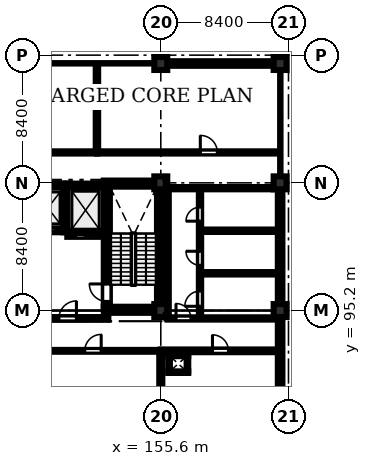
"""IFC4 building model, lengths in metres.
Left out: names, types, materials, properties, quantities, classifications, styles, units other than length and angle.
Written with IfcOpenShell. Run it as: python <this file> out.ifc"""

import sys

from ifc_helpers import new_model, si_unit, direction, frame, frame_2d, origin, origin_2d, place, context, subcontext, project, spatial, rectangle, extrude, element, fill, save


model = new_model("IFC4")
c1 = context("Model", 3, precision=1e-05, world=origin(), true_north=direction((0.0, 1.0)))
c2 = subcontext(c1, "Body", "Model", "MODEL_VIEW")
j1 = project(units=[si_unit("LENGTHUNIT", "METRE"), si_unit("PLANEANGLEUNIT", "RADIAN")], contexts=[c1])
p1 = place(None, origin())
s1 = spatial("IfcSite", under=j1, at=p1, CompositionType="ELEMENT")
p2 = place(p1, origin())
s2 = spatial("IfcBuilding", under=s1, at=p2, CompositionType="ELEMENT")
p3 = place(p2, frame((0.0, 0.0, 23.4)))
s3 = spatial("IfcBuildingStorey", under=s2, at=p3, CompositionType="ELEMENT", Elevation=23.4)
for number, where, z_axis, x_axis in (
    (1, (155.6, 95.2, 0.0), (0.0, 0.0, 1.0), (1.0, 0.0, 0.0)),
    (2, (155.6, 103.6, 0.0), (0.0, 0.0, 1.0), (1.0, 0.0, 0.0)),
    (3, (155.6, 111.45, 0.0), (0.0, 0.0, 1.0), (1.0, 0.0, 0.0)),
    (4, (163.45, 95.2, 0.0), (0.0, 0.0, 1.0), (1.0, 0.0, 0.0)),
    (5, (163.45, 103.6, 0.0), (0.0, 0.0, 1.0), (1.0, 0.0, 0.0)),
    (6, (163.45, 111.45, 0.0), (0.0, 0.0, 1.0), (1.0, 0.0, 0.0)),
):
    element("IfcColumn", number, at=place(p3, frame(where, z_axis=z_axis, x_axis=x_axis)), inside=s3, PredefinedType="COLUMN", context=c2, shape_type="SweptSolid", body=[
        extrude(rectangle(XDim=0.85, YDim=0.85, at=origin_2d()), origin(), (0.0, 0.0, 1.0), 4.0),
    ])
for number, where, z_axis, x_axis in (
    (7, (151.85, 95.25, 0.0), (0.0, 0.0, 1.0), (1.0, 0.0, 0.0)),
    (8, (151.85, 103.55, 0.0), (0.0, 0.0, 1.0), (1.0, 0.0, 0.0)),
):
    element("IfcWall", number, at=place(p3, frame(where, z_axis=z_axis, x_axis=x_axis)), inside=s3, PredefinedType="SHEAR", context=c2, shape_type="SweptSolid", body=[
        extrude(rectangle(XDim=3.9, YDim=0.4, at=frame_2d((1.95, 0.0))), origin(), (0.0, 0.0, 1.0), 4.0),
    ])
p4 = place(p3, frame((152.05, 95.45, 0.0), z_axis=(0.0, 0.0, 1.0), x_axis=(0.0, 1.0, 0.0)))
e9 = element("IfcWall", 9, at=p4, inside=s3, PredefinedType="SHEAR", context=c2, shape_type="SweptSolid", body=[
    extrude(rectangle(XDim=7.9, YDim=0.4, at=frame_2d((3.95, 0.0))), origin(), (0.0, 0.0, 1.0), 4.0),
])
p5 = place(p4, frame((0.35, 0.0, 0.0)))
e10 = element("IfcOpeningElement", 10, at=p5, cuts=e9, PredefinedType="OPENING", context=c2, shape_type="SweptSolid", body=[
    extrude(rectangle(XDim=1.15, YDim=2.15, at=frame_2d((0.575, 1.075))), frame((0.0, 0.21, 0.0), z_axis=(0.0, -1.0, 0.0), x_axis=(1.0, 0.0, 0.0)), (0.0, 0.0, 1.0), 0.42),
])
p6 = place(p3, frame((155.55, 95.45, 0.0), z_axis=(0.0, 0.0, 1.0), x_axis=(0.0, 1.0, 0.0)))
e11 = element("IfcWall", 11, at=p6, inside=s3, PredefinedType="SHEAR", context=c2, shape_type="SweptSolid", body=[
    extrude(rectangle(XDim=7.9, YDim=0.4, at=frame_2d((3.95, 0.0))), origin(), (0.0, 0.0, 1.0), 4.0),
])
p7 = place(p3, frame((147.15, 100.475, 0.0), z_axis=(0.0, 0.0, 1.0), x_axis=(1.0, 0.0, 0.0)))
e12 = element("IfcWall", 12, at=p7, inside=s3, PredefinedType="SHEAR", context=c2, shape_type="SweptSolid", body=[
    extrude(rectangle(XDim=2.05, YDim=0.25, at=frame_2d((1.025, 0.0))), origin(), (0.0, 0.0, 1.0), 4.0),
])
p8 = place(p7, frame((0.495, 0.0, 0.0)))
e13 = element("IfcOpeningElement", 13, at=p8, cuts=e12, PredefinedType="OPENING", context=c2, shape_type="SweptSolid", body=[
    extrude(rectangle(XDim=1.06, YDim=2.15, at=frame_2d((0.53, 1.075))), frame((0.0, 0.135, 0.0), z_axis=(0.0, -1.0, 0.0), x_axis=(1.0, 0.0, 0.0)), (0.0, 0.0, 1.0), 0.27),
])
p9 = place(p3, frame((147.15, 103.425, 0.0), z_axis=(0.0, 0.0, 1.0), x_axis=(1.0, 0.0, 0.0)))
e14 = element("IfcWall", 14, at=p9, inside=s3, PredefinedType="SHEAR", context=c2, shape_type="SweptSolid", body=[
    extrude(rectangle(XDim=2.05, YDim=0.25, at=frame_2d((1.025, 0.0))), origin(), (0.0, 0.0, 1.0), 4.0),
])
p10 = place(p3, frame((149.325, 100.35, 0.0), z_axis=(0.0, 0.0, 1.0), x_axis=(0.0, 1.0, 0.0)))
e15 = element("IfcWall", 15, at=p10, inside=s3, PredefinedType="SHEAR", context=c2, shape_type="SweptSolid", body=[
    extrude(rectangle(XDim=3.2, YDim=0.25, at=frame_2d((1.6, 0.0))), origin(), (0.0, 0.0, 1.0), 4.0),
])
p11 = place(p3, frame((149.45, 100.175, 0.0), z_axis=(0.0, 0.0, 1.0), x_axis=(1.0, 0.0, 0.0)))
e16 = element("IfcWall", 16, at=p11, inside=s3, PredefinedType="SHEAR", context=c2, shape_type="SweptSolid", body=[
    extrude(rectangle(XDim=2.4, YDim=0.25, at=frame_2d((1.2, 0.0))), origin(), (0.0, 0.0, 1.0), 4.0),
])
p12 = place(p11, frame((0.55, 0.0, 0.0)))
e17 = element("IfcOpeningElement", 17, at=p12, cuts=e16, PredefinedType="OPENING", context=c2, shape_type="SweptSolid", body=[
    extrude(rectangle(XDim=1.3, YDim=2.25, at=frame_2d((0.65, 1.125))), frame((0.0, 0.135, 0.0), z_axis=(0.0, -1.0, 0.0), x_axis=(1.0, 0.0, 0.0)), (0.0, 0.0, 1.0), 0.27),
])
p13 = place(p3, frame((149.45, 103.425, 0.0), z_axis=(0.0, 0.0, 1.0), x_axis=(1.0, 0.0, 0.0)))
e18 = element("IfcWall", 18, at=p13, inside=s3, PredefinedType="SHEAR", context=c2, shape_type="SweptSolid", body=[
    extrude(rectangle(XDim=2.4, YDim=0.25, at=frame_2d((1.2, 0.0))), origin(), (0.0, 0.0, 1.0), 4.0),
])
p14 = place(p3, frame((156.025, 111.45, 0.0), z_axis=(0.0, 0.0, 1.0), x_axis=(1.0, 0.0, 0.0)))
e19 = element("IfcWall", 19, at=p14, inside=s3, PredefinedType="STANDARD", context=c2, shape_type="SweptSolid", body=[
    extrude(rectangle(XDim=7.0, YDim=0.3, at=frame_2d((3.5, 0.0))), origin(), (0.0, 0.0, 1.0), 3.3),
])
p15 = place(p14, frame((0.85, 0.0, 0.9)))
e20 = element("IfcOpeningElement", 20, at=p15, cuts=e19, PredefinedType="OPENING", context=c2, shape_type="SweptSolid", body=[
    extrude(rectangle(XDim=1.8, YDim=2.1, at=frame_2d((0.9, 1.05))), frame((0.0, 0.16, 0.0), z_axis=(0.0, -1.0, 0.0), x_axis=(1.0, 0.0, 0.0)), (0.0, 0.0, 1.0), 0.32),
])
p16 = place(p14, frame((4.65, 0.0, 0.9)))
e21 = element("IfcOpeningElement", 21, at=p16, cuts=e19, PredefinedType="OPENING", context=c2, shape_type="SweptSolid", body=[
    extrude(rectangle(XDim=1.8, YDim=2.1, at=frame_2d((0.9, 1.05))), frame((0.0, 0.16, 0.0), z_axis=(0.0, -1.0, 0.0), x_axis=(1.0, 0.0, 0.0)), (0.0, 0.0, 1.0), 0.32),
])
p17 = place(p3, frame((163.45, 94.775, 0.0), z_axis=(0.0, 0.0, 1.0), x_axis=(0.0, -1.0, 0.0)))
e22 = element("IfcWall", 22, at=p17, inside=s3, PredefinedType="STANDARD", context=c2, shape_type="SweptSolid", body=[
    extrude(rectangle(XDim=7.55, YDim=0.3, at=frame_2d((3.775, 0.0))), origin(), (0.0, 0.0, 1.0), 3.3),
])
p18 = place(p17, frame((4.2, 0.0, 1.1)))
e23 = element("IfcOpeningElement", 23, at=p18, cuts=e22, PredefinedType="OPENING", context=c2, shape_type="SweptSolid", body=[
    extrude(rectangle(XDim=1.55, YDim=1.75, at=frame_2d((0.775, 0.875))), frame((0.0, 0.16, 0.0), z_axis=(0.0, -1.0, 0.0), x_axis=(1.0, 0.0, 0.0)), (0.0, 0.0, 1.0), 0.32),
])
p19 = place(p3, frame((163.45, 103.175, 0.0), z_axis=(0.0, 0.0, 1.0), x_axis=(0.0, -1.0, 0.0)))
e24 = element("IfcWall", 24, at=p19, inside=s3, PredefinedType="STANDARD", context=c2, shape_type="SweptSolid", body=[
    extrude(rectangle(XDim=7.55, YDim=0.3, at=frame_2d((3.775, 0.0))), origin(), (0.0, 0.0, 1.0), 3.3),
])
p20 = place(p19, frame((1.15, 0.0, 1.1)))
e25 = element("IfcOpeningElement", 25, at=p20, cuts=e24, PredefinedType="OPENING", context=c2, shape_type="SweptSolid", body=[
    extrude(rectangle(XDim=1.4, YDim=1.4, at=frame_2d((0.7, 0.7))), frame((0.0, 0.16, 0.0), z_axis=(0.0, -1.0, 0.0), x_axis=(1.0, 0.0, 0.0)), (0.0, 0.0, 1.0), 0.32),
])
p21 = place(p3, frame((147.3, 94.68, 0.0), z_axis=(0.0, 0.0, 1.0), x_axis=(1.0, 0.0, 0.0)))
e26 = element("IfcWall", 26, at=p21, inside=s3, PredefinedType="STANDARD", context=c2, shape_type="SweptSolid", body=[
    extrude(rectangle(XDim=4.85, YDim=0.18, at=frame_2d((2.425, 0.0))), origin(), (0.0, 0.0, 1.0), 4.0),
])
p22 = place(p21, frame((1.6, 0.0, 0.0)))
e27 = element("IfcOpeningElement", 27, at=p22, cuts=e26, PredefinedType="OPENING", context=c2, shape_type="SweptSolid", body=[
    extrude(rectangle(XDim=1.15, YDim=2.15, at=frame_2d((0.575, 1.075))), frame((0.0, 0.1, 0.0), z_axis=(0.0, -1.0, 0.0), x_axis=(1.0, 0.0, 0.0)), (0.0, 0.0, 1.0), 0.2),
])
p23 = place(p3, frame((156.05, 94.68, 0.0), z_axis=(0.0, 0.0, 1.0), x_axis=(1.0, 0.0, 0.0)))
e28 = element("IfcWall", 28, at=p23, inside=s3, PredefinedType="PARTITIONING", context=c2, shape_type="SweptSolid", body=[
    extrude(rectangle(XDim=7.15, YDim=0.15, at=frame_2d((3.575, 0.0))), origin(), (0.0, 0.0, 1.0), 4.0),
])
p24 = place(p23, frame((0.55, 0.0, 0.0)))
e29 = element("IfcOpeningElement", 29, at=p24, cuts=e28, PredefinedType="OPENING", context=c2, shape_type="SweptSolid", body=[
    extrude(rectangle(XDim=0.98, YDim=2.12, at=frame_2d((0.49, 1.06))), frame((0.0, 0.085, 0.0), z_axis=(0.0, -1.0, 0.0), x_axis=(1.0, 0.0, 0.0)), (0.0, 0.0, 1.0), 0.17),
])
p25 = place(p3, frame((158.18, 94.68, 0.0), z_axis=(0.0, 0.0, 1.0), x_axis=(0.0, 1.0, 0.0)))
e30 = element("IfcWall", 30, at=p25, inside=s3, PredefinedType="PARTITIONING", context=c2, shape_type="SweptSolid", body=[
    extrude(rectangle(XDim=8.57, YDim=0.15, at=frame_2d((4.285, 0.0))), origin(), (0.0, 0.0, 1.0), 4.0),
])
p26 = place(p25, frame((0.8, 0.0, 0.0)))
e31 = element("IfcOpeningElement", 31, at=p26, cuts=e30, PredefinedType="OPENING", context=c2, shape_type="SweptSolid", body=[
    extrude(rectangle(XDim=1.0, YDim=2.12, at=frame_2d((0.5, 1.06))), frame((0.0, 0.085, 0.0), z_axis=(0.0, -1.0, 0.0), x_axis=(1.0, 0.0, 0.0)), (0.0, 0.0, 1.0), 0.17),
])
p27 = place(p25, frame((3.5, 0.0, 0.0)))
e32 = element("IfcOpeningElement", 32, at=p27, cuts=e30, PredefinedType="OPENING", context=c2, shape_type="SweptSolid", body=[
    extrude(rectangle(XDim=0.92, YDim=2.1, at=frame_2d((0.46, 1.05))), frame((0.0, 0.085, 0.0), z_axis=(0.0, -1.0, 0.0), x_axis=(1.0, 0.0, 0.0)), (0.0, 0.0, 1.0), 0.17),
])
p28 = place(p25, frame((6.4, 0.0, 0.0)))
e33 = element("IfcOpeningElement", 33, at=p28, cuts=e30, PredefinedType="OPENING", context=c2, shape_type="SweptSolid", body=[
    extrude(rectangle(XDim=0.92, YDim=2.1, at=frame_2d((0.46, 1.05))), frame((0.0, 0.085, 0.0), z_axis=(0.0, -1.0, 0.0), x_axis=(1.0, 0.0, 0.0)), (0.0, 0.0, 1.0), 0.17),
])
for number, where, z_axis, x_axis in (
    (34, (158.18, 97.65, 0.0), (0.0, 0.0, 1.0), (1.0, 0.0, 0.0)),
    (35, (158.18, 100.45, 0.0), (0.0, 0.0, 1.0), (1.0, 0.0, 0.0)),
):
    element("IfcWall", number, at=place(p3, frame(where, z_axis=z_axis, x_axis=x_axis)), inside=s3, PredefinedType="PARTITIONING", context=c2, shape_type="SweptSolid", body=[
        extrude(rectangle(XDim=5.02, YDim=0.158, at=frame_2d((2.51, 0.0))), origin(), (0.0, 0.0, 1.0), 4.0),
    ])
p29 = place(p3, frame((156.05, 103.25, 0.0), z_axis=(0.0, 0.0, 1.0), x_axis=(1.0, 0.0, 0.0)))
e36 = element("IfcWall", 36, at=p29, inside=s3, PredefinedType="PARTITIONING", context=c2, shape_type="SweptSolid", body=[
    extrude(rectangle(XDim=7.15, YDim=0.15, at=frame_2d((3.575, 0.0))), origin(), (0.0, 0.0, 1.0), 4.0),
])
p30 = place(p3, frame((156.05, 94.68, 0.0), z_axis=(0.0, 0.0, 1.0), x_axis=(0.0, 1.0, 0.0)))
e37 = element("IfcWall", 37, at=p30, inside=s3, PredefinedType="PARTITIONING", context=c2, shape_type="SweptSolid", body=[
    extrude(rectangle(XDim=8.57, YDim=0.15, at=frame_2d((4.285, 0.0))), origin(), (0.0, 0.0, 1.0), 4.0),
])
p31 = place(p3, frame((134.6, 105.6, 0.0), z_axis=(0.0, 0.0, 1.0), x_axis=(1.0, 0.0, 0.0)))
e38 = element("IfcWall", 38, at=p31, inside=s3, PredefinedType="PARTITIONING", context=c2, shape_type="SweptSolid", body=[
    extrude(rectangle(XDim=16.8, YDim=0.145, at=frame_2d((8.4, 0.0))), origin(), (0.0, 0.0, 1.0), 4.0),
])
p32 = place(p31, frame((6.8, 0.0, 0.0)))
e39 = element("IfcOpeningElement", 39, at=p32, cuts=e38, PredefinedType="OPENING", context=c2, shape_type="SweptSolid", body=[
    extrude(rectangle(XDim=1.46, YDim=2.22, at=frame_2d((0.73, 1.11))), frame((0.0, 0.083, 0.0), z_axis=(0.0, -1.0, 0.0), x_axis=(1.0, 0.0, 0.0)), (0.0, 0.0, 1.0), 0.165),
])
p33 = place(p3, frame((151.4, 105.6, 0.0), z_axis=(0.0, 0.0, 1.0), x_axis=(1.0, 0.0, 0.0)))
e40 = element("IfcWall", 40, at=p33, inside=s3, PredefinedType="PARTITIONING", context=c2, shape_type="SweptSolid", body=[
    extrude(rectangle(XDim=11.95, YDim=0.145, at=frame_2d((5.975, 0.0))), origin(), (0.0, 0.0, 1.0), 4.0),
])
p34 = place(p33, frame((6.8, 0.0, 0.0)))
e41 = element("IfcOpeningElement", 41, at=p34, cuts=e40, PredefinedType="OPENING", context=c2, shape_type="SweptSolid", body=[
    extrude(rectangle(XDim=1.12, YDim=2.18, at=frame_2d((0.56, 1.09))), frame((0.0, 0.083, 0.0), z_axis=(0.0, -1.0, 0.0), x_axis=(1.0, 0.0, 0.0)), (0.0, 0.0, 1.0), 0.165),
])
p35 = place(p3, frame((151.4, 105.6, 0.0), z_axis=(0.0, 0.0, 1.0), x_axis=(0.0, 1.0, 0.0)))
e42 = element("IfcWall", 42, at=p35, inside=s3, PredefinedType="PARTITIONING", context=c2, shape_type="SweptSolid", body=[
    extrude(rectangle(XDim=5.75, YDim=0.158, at=frame_2d((2.875, 0.0))), origin(), (0.0, 0.0, 1.0), 3.5),
])
p36 = place(p3, frame((147.2, 92.55, 0.0), z_axis=(0.0, 0.0, 1.0), x_axis=(1.0, 0.0, 0.0)))
e43 = element("IfcWall", 43, at=p36, inside=s3, PredefinedType="PARTITIONING", context=c2, shape_type="SweptSolid", body=[
    extrude(rectangle(XDim=8.4, YDim=0.12, at=frame_2d((4.2, 0.0))), origin(), (0.0, 0.0, 1.0), 4.0),
])
p37 = place(p36, frame((3.4, 0.0, 0.0)))
e44 = element("IfcOpeningElement", 44, at=p37, cuts=e43, PredefinedType="OPENING", context=c2, shape_type="SweptSolid", body=[
    extrude(rectangle(XDim=1.08, YDim=2.15, at=frame_2d((0.54, 1.075))), frame((0.0, 0.07, 0.0), z_axis=(0.0, -1.0, 0.0), x_axis=(1.0, 0.0, 0.0)), (0.0, 0.0, 1.0), 0.14),
])
p38 = place(p3, frame((155.6, 92.55, 0.0), z_axis=(0.0, 0.0, 1.0), x_axis=(1.0, 0.0, 0.0)))
e45 = element("IfcWall", 45, at=p38, inside=s3, PredefinedType="STANDARD", context=c2, shape_type="SweptSolid", body=[
    extrude(rectangle(XDim=7.75, YDim=0.18, at=frame_2d((3.875, 0.0))), origin(), (0.0, 0.0, 1.0), 4.0),
])
p39 = place(p38, frame((3.4, 0.0, 0.0)))
e46 = element("IfcOpeningElement", 46, at=p39, cuts=e45, PredefinedType="OPENING", context=c2, shape_type="SweptSolid", body=[
    extrude(rectangle(XDim=1.05, YDim=2.15, at=frame_2d((0.525, 1.075))), frame((0.0, 0.1, 0.0), z_axis=(0.0, -1.0, 0.0), x_axis=(1.0, 0.0, 0.0)), (0.0, 0.0, 1.0), 0.2),
])
p40 = place(p3, frame((155.6, 78.55, 0.0), z_axis=(0.0, 0.0, 1.0), x_axis=(0.0, 1.0, 0.0)))
e47 = element("IfcWall", 47, at=p40, inside=s3, PredefinedType="SOLIDWALL", context=c2, shape_type="SweptSolid", body=[
    extrude(rectangle(XDim=14.0, YDim=0.2, at=frame_2d((7.0, 0.0))), origin(), (0.0, 0.0, 1.0), 3.3),
])
for number, where, z_axis, x_axis in (
    (48, (156.095, 91.147, 0.0), (0.0, 0.0, 1.0), (1.0, 0.0, 0.0)),
    (49, (156.095, 92.252, 0.0), (0.0, 0.0, 1.0), (1.0, 0.0, 0.0)),
):
    element("IfcWall", number, at=place(p3, frame(where, z_axis=z_axis, x_axis=x_axis)), inside=s3, PredefinedType="PARTITIONING", context=c2, shape_type="SweptSolid", body=[
        extrude(rectangle(XDim=1.31, YDim=0.105, at=frame_2d((0.655, 0.0))), origin(), (0.0, 0.0, 1.0), 4.0),
    ])
for number, where, z_axis, x_axis in (
    (50, (156.147, 91.2, 0.0), (0.0, 0.0, 1.0), (0.0, 1.0, 0.0)),
    (51, (157.353, 91.2, 0.0), (0.0, 0.0, 1.0), (0.0, 1.0, 0.0)),
):
    element("IfcWall", number, at=place(p3, frame(where, z_axis=z_axis, x_axis=x_axis)), inside=s3, PredefinedType="PARTITIONING", context=c2, shape_type="SweptSolid", body=[
        extrude(rectangle(XDim=1.0, YDim=0.105, at=frame_2d((0.5, 0.0))), origin(), (0.0, 0.0, 1.0), 4.0),
    ])
p41 = place(p15, origin())
e52 = element("IfcWindow", 52, at=p41, inside=s3, PartitioningType="DOUBLE_PANEL_VERTICAL", PredefinedType="WINDOW", context=c2, shape_type="SweptSolid", body=[
    extrude(rectangle(XDim=1.8, YDim=2.1, at=frame_2d((0.9, 1.05))), frame((0.0, 0.03, 0.0), z_axis=(0.0, -1.0, 0.0), x_axis=(1.0, 0.0, 0.0)), (0.0, 0.0, 1.0), 0.06),
])
fill(e20, e52)
p42 = place(p16, origin())
e53 = element("IfcWindow", 53, at=p42, inside=s3, PartitioningType="DOUBLE_PANEL_VERTICAL", PredefinedType="WINDOW", context=c2, shape_type="SweptSolid", body=[
    extrude(rectangle(XDim=1.8, YDim=2.1, at=frame_2d((0.9, 1.05))), frame((0.0, 0.03, 0.0), z_axis=(0.0, -1.0, 0.0), x_axis=(1.0, 0.0, 0.0)), (0.0, 0.0, 1.0), 0.06),
])
fill(e21, e53)
p43 = place(p18, origin())
e54 = element("IfcWindow", 54, at=p43, inside=s3, PartitioningType="DOUBLE_PANEL_VERTICAL", PredefinedType="WINDOW", context=c2, shape_type="SweptSolid", body=[
    extrude(rectangle(XDim=1.55, YDim=1.75, at=frame_2d((0.775, 0.875))), frame((0.0, 0.03, 0.0), z_axis=(0.0, -1.0, 0.0), x_axis=(1.0, 0.0, 0.0)), (0.0, 0.0, 1.0), 0.06),
])
fill(e23, e54)
p44 = place(p20, origin())
e55 = element("IfcWindow", 55, at=p44, inside=s3, PartitioningType="SINGLE_PANEL", PredefinedType="WINDOW", context=c2, shape_type="SweptSolid", body=[
    extrude(rectangle(XDim=1.4, YDim=1.4, at=frame_2d((0.7, 0.7))), frame((0.0, 0.03, 0.0), z_axis=(0.0, -1.0, 0.0), x_axis=(1.0, 0.0, 0.0)), (0.0, 0.0, 1.0), 0.06),
])
fill(e25, e55)
p45 = place(p22, origin())
e56 = element("IfcDoor", 56, at=p45, inside=s3, OperationType="SINGLE_SWING_RIGHT", PredefinedType="DOOR", context=c2, shape_type="SweptSolid", body=[
    extrude(rectangle(XDim=1.15, YDim=2.15, at=frame_2d((0.575, 1.075))), frame((0.0, 0.025, 0.0), z_axis=(0.0, -1.0, 0.0), x_axis=(1.0, 0.0, 0.0)), (0.0, 0.0, 1.0), 0.05),
])
fill(e27, e56)
p46 = place(p24, origin())
e57 = element("IfcDoor", 57, at=p46, inside=s3, OperationType="SINGLE_SWING_LEFT", PredefinedType="DOOR", context=c2, shape_type="SweptSolid", body=[
    extrude(rectangle(XDim=0.98, YDim=2.12, at=frame_2d((0.49, 1.06))), frame((0.0, 0.025, 0.0), z_axis=(0.0, -1.0, 0.0), x_axis=(1.0, 0.0, 0.0)), (0.0, 0.0, 1.0), 0.05),
])
fill(e29, e57)
p47 = place(p26, origin())
e58 = element("IfcDoor", 58, at=p47, inside=s3, OperationType="SINGLE_SWING_LEFT", PredefinedType="DOOR", context=c2, shape_type="SweptSolid", body=[
    extrude(rectangle(XDim=1.0, YDim=2.12, at=frame_2d((0.5, 1.06))), frame((0.0, 0.025, 0.0), z_axis=(0.0, -1.0, 0.0), x_axis=(1.0, 0.0, 0.0)), (0.0, 0.0, 1.0), 0.05),
])
fill(e31, e58)
p48 = place(p27, origin())
e59 = element("IfcDoor", 59, at=p48, inside=s3, OperationType="SINGLE_SWING_RIGHT", PredefinedType="DOOR", context=c2, shape_type="SweptSolid", body=[
    extrude(rectangle(XDim=0.92, YDim=2.1, at=frame_2d((0.46, 1.05))), frame((0.0, 0.025, 0.0), z_axis=(0.0, -1.0, 0.0), x_axis=(1.0, 0.0, 0.0)), (0.0, 0.0, 1.0), 0.05),
])
fill(e32, e59)
p49 = place(p28, origin())
e60 = element("IfcDoor", 60, at=p49, inside=s3, OperationType="SINGLE_SWING_LEFT", PredefinedType="DOOR", context=c2, shape_type="SweptSolid", body=[
    extrude(rectangle(XDim=0.92, YDim=2.1, at=frame_2d((0.46, 1.05))), frame((0.0, 0.025, 0.0), z_axis=(0.0, -1.0, 0.0), x_axis=(1.0, 0.0, 0.0)), (0.0, 0.0, 1.0), 0.05),
])
fill(e33, e60)
p50 = place(p34, origin())
e61 = element("IfcDoor", 61, at=p50, inside=s3, OperationType="SINGLE_SWING_LEFT", PredefinedType="DOOR", context=c2, shape_type="SweptSolid", body=[
    extrude(rectangle(XDim=1.12, YDim=2.18, at=frame_2d((0.56, 1.09))), frame((0.0, 0.025, 0.0), z_axis=(0.0, -1.0, 0.0), x_axis=(1.0, 0.0, 0.0)), (0.0, 0.0, 1.0), 0.05),
])
fill(e41, e61)
p51 = place(p37, origin())
e62 = element("IfcDoor", 62, at=p51, inside=s3, OperationType="SINGLE_SWING_RIGHT", PredefinedType="DOOR", context=c2, shape_type="SweptSolid", body=[
    extrude(rectangle(XDim=1.08, YDim=2.15, at=frame_2d((0.54, 1.075))), frame((0.0, 0.025, 0.0), z_axis=(0.0, -1.0, 0.0), x_axis=(1.0, 0.0, 0.0)), (0.0, 0.0, 1.0), 0.05),
])
fill(e44, e62)
p52 = place(p39, origin())
e63 = element("IfcDoor", 63, at=p52, inside=s3, OperationType="SINGLE_SWING_LEFT", PredefinedType="DOOR", context=c2, shape_type="SweptSolid", body=[
    extrude(rectangle(XDim=1.05, YDim=2.15, at=frame_2d((0.525, 1.075))), frame((0.0, 0.025, 0.0), z_axis=(0.0, -1.0, 0.0), x_axis=(1.0, 0.0, 0.0)), (0.0, 0.0, 1.0), 0.05),
])
fill(e46, e63)
p53 = place(p5, origin())
e64 = element("IfcDoor", 64, at=p53, inside=s3, OperationType="SINGLE_SWING_RIGHT", PredefinedType="DOOR", context=c2, shape_type="SweptSolid", body=[
    extrude(rectangle(XDim=1.15, YDim=2.15, at=frame_2d((0.575, 1.075))), frame((0.0, 0.025, 0.0), z_axis=(0.0, -1.0, 0.0), x_axis=(1.0, 0.0, 0.0)), (0.0, 0.0, 1.0), 0.05),
])
fill(e10, e64)
p54 = place(p8, origin())
e65 = element("IfcDoor", 65, at=p54, inside=s3, OperationType="SLIDING_TO_LEFT", PredefinedType="DOOR", context=c2, shape_type="SweptSolid", body=[
    extrude(rectangle(XDim=1.06, YDim=2.15, at=frame_2d((0.53, 1.075))), frame((0.0, 0.025, 0.0), z_axis=(0.0, -1.0, 0.0), x_axis=(1.0, 0.0, 0.0)), (0.0, 0.0, 1.0), 0.05),
])
fill(e13, e65)
p55 = place(p12, origin())
e66 = element("IfcDoor", 66, at=p55, inside=s3, OperationType="SLIDING_TO_LEFT", PredefinedType="DOOR", context=c2, shape_type="SweptSolid", body=[
    extrude(rectangle(XDim=1.3, YDim=2.25, at=frame_2d((0.65, 1.125))), frame((0.0, 0.025, 0.0), z_axis=(0.0, -1.0, 0.0), x_axis=(1.0, 0.0, 0.0)), (0.0, 0.0, 1.0), 0.05),
])
fill(e17, e66)
save(model, sys.argv[1])
